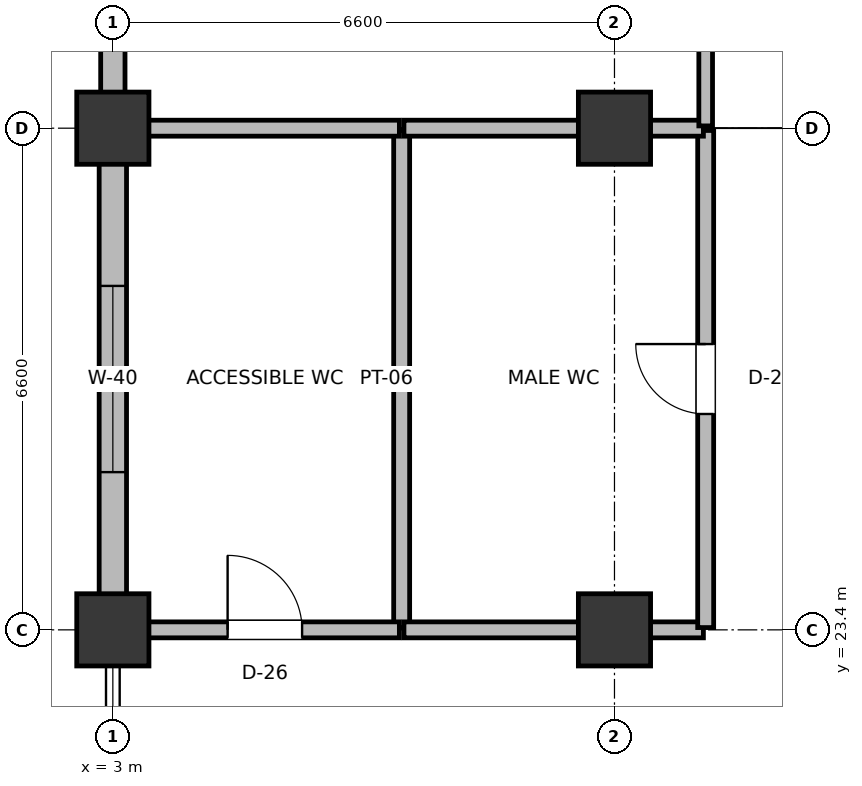
"""IFC4 building model, lengths in metres.
Left out: names, types, materials, properties, quantities, classifications, styles, units other than length and angle.
Written with IfcOpenShell. Run it as: python <this file> out.ifc"""

import sys

from ifc_helpers import new_model, si_unit, direction, frame, frame_2d, origin, origin_2d, place, context, subcontext, project, spatial, rectangle, extrude, element, fill, save


model = new_model("IFC4")
c1 = context("Model", 3, precision=1e-05, world=origin(), true_north=direction((0.0, 1.0)))
c2 = subcontext(c1, "Body", "Model", "MODEL_VIEW")
j1 = project(units=[si_unit("LENGTHUNIT", "METRE"), si_unit("PLANEANGLEUNIT", "RADIAN")], contexts=[c1])
p1 = place(None, origin())
s1 = spatial("IfcSite", under=j1, at=p1, CompositionType="ELEMENT")
p2 = place(p1, origin())
s2 = spatial("IfcBuilding", under=s1, at=p2, CompositionType="ELEMENT")
p3 = place(p2, frame((0.0, 0.0, 5.4)))
s3 = spatial("IfcBuildingStorey", under=s2, at=p3, CompositionType="ELEMENT", Elevation=5.4)
for number, where, z_axis, x_axis in (
    (1, (3.0, 23.4, 0.0), (0.0, 0.0, 1.0), (1.0, 0.0, 0.0)),
    (2, (3.0, 30.0, 0.0), (0.0, 0.0, 1.0), (1.0, 0.0, 0.0)),
    (3, (9.6, 23.4, 0.0), (0.0, 0.0, 1.0), (1.0, 0.0, 0.0)),
    (4, (9.6, 30.0, 0.0), (0.0, 0.0, 1.0), (1.0, 0.0, 0.0)),
):
    element("IfcColumn", number, at=place(p3, frame(where, z_axis=z_axis, x_axis=x_axis)), inside=s3, PredefinedType="COLUMN", context=c2, shape_type="SweptSolid", body=[
        extrude(rectangle(XDim=0.95, YDim=0.95, at=origin_2d()), origin(), (0.0, 0.0, 1.0), 4.8),
    ])
p4 = place(p3, frame((3.0, 23.855, 0.0), z_axis=(0.0, 0.0, 1.0), x_axis=(0.0, 1.0, 0.0)))
e5 = element("IfcWall", 5, at=p4, inside=s3, PredefinedType="SOLIDWALL", context=c2, shape_type="SweptSolid", body=[
    extrude(rectangle(XDim=5.69, YDim=0.36, at=frame_2d((2.845, 0.0))), origin(), (0.0, 0.0, 1.0), 3.875),
])
p5 = place(p4, frame((1.62, 0.0, 0.9)))
e6 = element("IfcOpeningElement", 6, at=p5, cuts=e5, PredefinedType="OPENING", context=c2, shape_type="SweptSolid", body=[
    extrude(rectangle(XDim=2.45, YDim=1.8, at=frame_2d((1.225, 0.9))), frame((0.0, 0.19, 0.0), z_axis=(0.0, -1.0, 0.0), x_axis=(1.0, 0.0, 0.0)), (0.0, 0.0, 1.0), 0.38),
])
p6 = place(p3, frame((3.0, 30.455, 0.0), z_axis=(0.0, 0.0, 1.0), x_axis=(0.0, 1.0, 0.0)))
e7 = element("IfcWall", 7, at=p6, inside=s3, PredefinedType="SOLIDWALL", context=c2, shape_type="SweptSolid", body=[
    extrude(rectangle(XDim=8.11, YDim=0.32, at=frame_2d((4.055, 0.0))), origin(), (0.0, 0.0, 1.0), 3.775),
])
p7 = place(p6, frame((3.48, 0.0, 0.9)))
e8 = element("IfcOpeningElement", 8, at=p7, cuts=e7, PredefinedType="OPENING", context=c2, shape_type="SweptSolid", body=[
    extrude(rectangle(XDim=1.15, YDim=1.55, at=frame_2d((0.575, 0.775))), frame((0.0, 0.17, 0.0), z_axis=(0.0, -1.0, 0.0), x_axis=(1.0, 0.0, 0.0)), (0.0, 0.0, 1.0), 0.34),
])
p8 = place(p3, frame((6.8, 23.43, 0.0), z_axis=(0.0, 0.0, 1.0), x_axis=(0.0, 1.0, 0.0)))
e9 = element("IfcWall", 9, at=p8, inside=s3, PredefinedType="PLUMBINGWALL", context=c2, shape_type="SweptSolid", body=[
    extrude(rectangle(XDim=6.54, YDim=0.21, at=frame_2d((3.27, 0.0))), origin(), (0.0, 0.0, 1.0), 3.725),
])
p9 = place(p3, frame((3.23, 23.4, 0.0), z_axis=(0.0, 0.0, 1.0), x_axis=(1.0, 0.0, 0.0)))
e10 = element("IfcWall", 10, at=p9, inside=s3, PredefinedType="PLUMBINGWALL", context=c2, shape_type="SweptSolid", body=[
    extrude(rectangle(XDim=3.54, YDim=0.21, at=frame_2d((1.77, 0.0))), origin(), (0.0, 0.0, 1.0), 3.955),
])
p10 = place(p9, frame((1.28, 0.0, 0.0)))
e11 = element("IfcOpeningElement", 11, at=p10, cuts=e10, PredefinedType="OPENING", context=c2, shape_type="SweptSolid", body=[
    extrude(rectangle(XDim=0.98, YDim=2.1, at=frame_2d((0.49, 1.05))), frame((0.0, 0.115, 0.0), z_axis=(0.0, -1.0, 0.0), x_axis=(1.0, 0.0, 0.0)), (0.0, 0.0, 1.0), 0.23),
])
p11 = place(p3, frame((3.23, 30.0, 0.0), z_axis=(0.0, 0.0, 1.0), x_axis=(1.0, 0.0, 0.0)))
e12 = element("IfcWall", 12, at=p11, inside=s3, PredefinedType="PLUMBINGWALL", context=c2, shape_type="SweptSolid", body=[
    extrude(rectangle(XDim=3.54, YDim=0.21, at=frame_2d((1.77, 0.0))), origin(), (0.0, 0.0, 1.0), 3.725),
])
p12 = place(p3, frame((6.83, 23.4, 0.0), z_axis=(0.0, 0.0, 1.0), x_axis=(1.0, 0.0, 0.0)))
e13 = element("IfcWall", 13, at=p12, inside=s3, PredefinedType="PLUMBINGWALL", context=c2, shape_type="SweptSolid", body=[
    extrude(rectangle(XDim=3.94, YDim=0.21, at=frame_2d((1.97, 0.0))), origin(), (0.0, 0.0, 1.0), 3.825),
])
p13 = place(p3, frame((10.8, 23.43, 0.0), z_axis=(0.0, 0.0, 1.0), x_axis=(0.0, 1.0, 0.0)))
e14 = element("IfcWall", 14, at=p13, inside=s3, PredefinedType="PLUMBINGWALL", context=c2, shape_type="SweptSolid", body=[
    extrude(rectangle(XDim=6.54, YDim=0.21, at=frame_2d((3.27, 0.0))), origin(), (0.0, 0.0, 1.0), 3.695),
])
p14 = place(p13, frame((2.81, 0.0, 0.0)))
e15 = element("IfcOpeningElement", 15, at=p14, cuts=e14, PredefinedType="OPENING", context=c2, shape_type="SweptSolid", body=[
    extrude(rectangle(XDim=0.92, YDim=2.1, at=frame_2d((0.46, 1.05))), frame((0.0, 0.115, 0.0), z_axis=(0.0, -1.0, 0.0), x_axis=(1.0, 0.0, 0.0)), (0.0, 0.0, 1.0), 0.23),
])
p15 = place(p3, frame((6.83, 30.0, 0.0), z_axis=(0.0, 0.0, 1.0), x_axis=(1.0, 0.0, 0.0)))
e16 = element("IfcWall", 16, at=p15, inside=s3, PredefinedType="PLUMBINGWALL", context=c2, shape_type="SweptSolid", body=[
    extrude(rectangle(XDim=3.94, YDim=0.21, at=frame_2d((1.97, 0.0))), origin(), (0.0, 0.0, 1.0), 3.695),
])
p16 = place(p3, frame((10.8, 30.03, 0.0), z_axis=(0.0, 0.0, 1.0), x_axis=(0.0, 1.0, 0.0)))
e17 = element("IfcWall", 17, at=p16, inside=s3, PredefinedType="PARTITIONING", context=c2, shape_type="SweptSolid", body=[
    extrude(rectangle(XDim=19.94, YDim=0.18, at=frame_2d((9.97, 0.0))), origin(), (0.0, 0.0, 1.0), 3.555),
])
p17 = place(p16, frame((9.625, 0.0, 0.0)))
e18 = element("IfcOpeningElement", 18, at=p17, cuts=e17, PredefinedType="OPENING", context=c2, shape_type="SweptSolid", body=[
    extrude(rectangle(XDim=1.05, YDim=2.2, at=frame_2d((0.525, 1.1))), frame((0.0, 0.1, 0.0), z_axis=(0.0, -1.0, 0.0), x_axis=(1.0, 0.0, 0.0)), (0.0, 0.0, 1.0), 0.2),
])
p18 = place(p5, origin())
e19 = element("IfcWindow", 19, at=p18, inside=s3, PartitioningType="DOUBLE_PANEL_VERTICAL", PredefinedType="WINDOW", context=c2, shape_type="SweptSolid", body=[
    extrude(rectangle(XDim=2.45, YDim=1.8, at=frame_2d((1.225, 0.9))), frame((0.0, 0.03, 0.0), z_axis=(0.0, -1.0, 0.0), x_axis=(1.0, 0.0, 0.0)), (0.0, 0.0, 1.0), 0.06),
])
fill(e6, e19)
p19 = place(p10, origin())
e20 = element("IfcDoor", 20, at=p19, inside=s3, OperationType="SINGLE_SWING_LEFT", PredefinedType="DOOR", context=c2, shape_type="SweptSolid", body=[
    extrude(rectangle(XDim=0.98, YDim=2.1, at=frame_2d((0.49, 1.05))), frame((0.0, 0.025, 0.0), z_axis=(0.0, -1.0, 0.0), x_axis=(1.0, 0.0, 0.0)), (0.0, 0.0, 1.0), 0.05),
])
fill(e11, e20)
p20 = place(p14, origin())
e21 = element("IfcDoor", 21, at=p20, inside=s3, OperationType="SINGLE_SWING_RIGHT", PredefinedType="DOOR", context=c2, shape_type="SweptSolid", body=[
    extrude(rectangle(XDim=0.92, YDim=2.1, at=frame_2d((0.46, 1.05))), frame((0.0, 0.025, 0.0), z_axis=(0.0, -1.0, 0.0), x_axis=(1.0, 0.0, 0.0)), (0.0, 0.0, 1.0), 0.05),
])
fill(e15, e21)
save(model, sys.argv[1])
